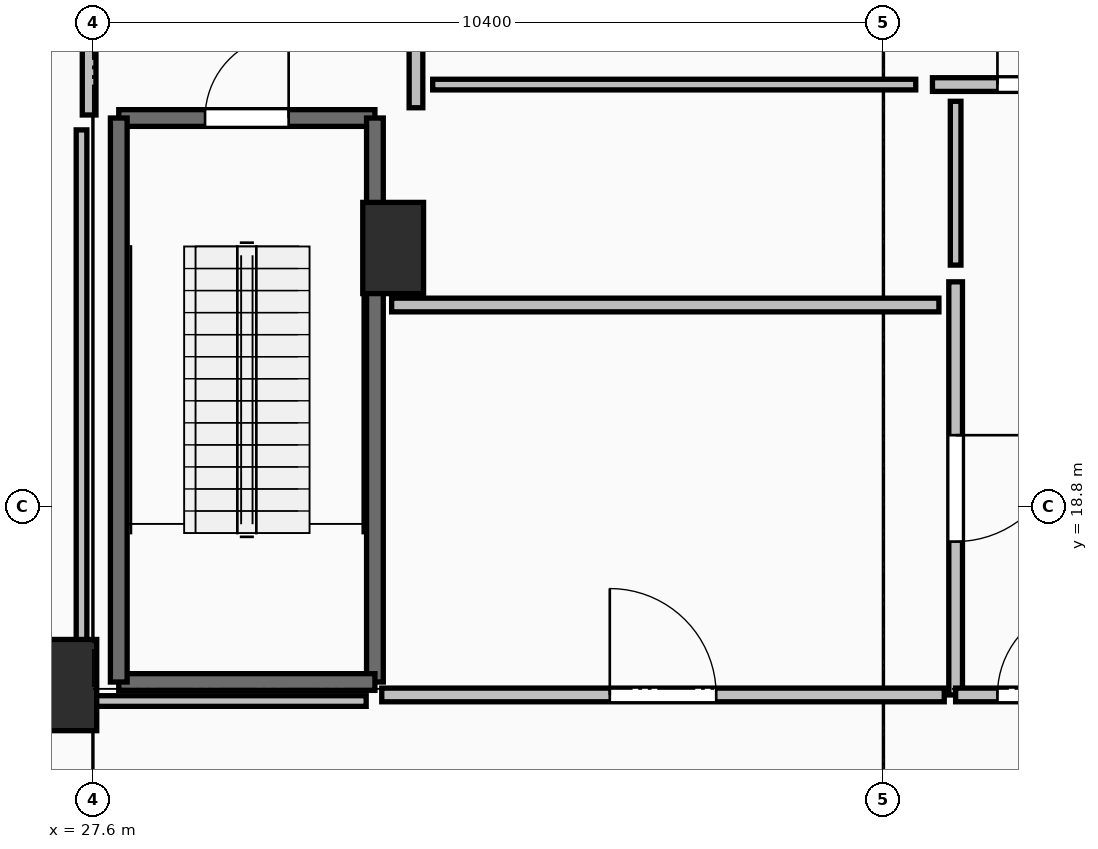
"""IFC4 building model, lengths in metres.
Left out: names, types, materials, properties, quantities, classifications, styles, units other than length and angle.
Written with IfcOpenShell. Run it as: python <this file> out.ifc"""

import sys

from ifc_helpers import new_model, si_unit, direction, frame, frame_2d, origin, origin_2d, place, context, subcontext, project, spatial, rectangle, extrude, element, fill, save


model = new_model("IFC4")
c1 = context("Model", 3, precision=1e-05, world=origin(), true_north=direction((0.0, 1.0)))
c2 = subcontext(c1, "Body", "Model", "MODEL_VIEW")
j1 = project(units=[si_unit("LENGTHUNIT", "METRE"), si_unit("PLANEANGLEUNIT", "RADIAN")], contexts=[c1])
p1 = place(None, origin())
s1 = spatial("IfcSite", under=j1, at=p1, CompositionType="ELEMENT")
p2 = place(p1, origin())
s2 = spatial("IfcBuilding", under=s1, at=p2, CompositionType="ELEMENT")
p3 = place(p2, frame((0.0, 0.0, -9.6)))
s3 = spatial("IfcBuildingStorey", under=s2, at=p3, CompositionType="ELEMENT", Elevation=-9.6)
for number, where, z_axis, x_axis in (
    (1, (27.25, 16.45, 0.0), (0.0, 0.0, 1.0), (1.0, 0.0, 0.0)),
    (2, (31.55, 22.2, 0.0), (0.0, 0.0, 1.0), (1.0, 0.0, 0.0)),
):
    element("IfcColumn", number, at=place(p3, frame(where, z_axis=z_axis, x_axis=x_axis)), inside=s3, PredefinedType="PILASTER", context=c2, shape_type="SweptSolid", body=[
        extrude(rectangle(XDim=0.8, YDim=1.2, at=origin_2d()), origin(), (0.0, 0.0, 1.0), 4.8),
    ])
p4 = place(p3, frame((27.94, 23.91, 0.0), z_axis=(0.0, 0.0, 1.0), x_axis=(1.0, 0.0, 0.0)))
e3 = element("IfcWall", 3, at=p4, inside=s3, PredefinedType="SOLIDWALL", context=c2, shape_type="SweptSolid", body=[
    extrude(rectangle(XDim=3.37, YDim=0.22, at=frame_2d((1.685, 0.0))), origin(), (0.0, 0.0, 1.0), 4.45),
])
p5 = place(p4, frame((1.135, 0.0, 0.0)))
e4 = element("IfcOpeningElement", 4, at=p5, cuts=e3, PredefinedType="OPENING", context=c2, shape_type="SweptSolid", body=[
    extrude(rectangle(XDim=1.1, YDim=2.15, at=frame_2d((0.55, 1.075))), frame((0.0, 0.125, 0.0), z_axis=(0.0, -1.0, 0.0), x_axis=(1.0, 0.0, 0.0)), (0.0, 0.0, 1.0), 0.25),
])
p6 = place(p3, frame((31.31, 23.91, 0.0), z_axis=(0.0, 0.0, 1.0), x_axis=(0.0, -1.0, 0.0)))
e5 = element("IfcWall", 5, at=p6, inside=s3, PredefinedType="SOLIDWALL", context=c2, shape_type="SweptSolid", body=[
    extrude(rectangle(XDim=7.42, YDim=0.22, at=frame_2d((3.71, 0.0))), origin(), (0.0, 0.0, 1.0), 4.45),
])
p7 = place(p3, frame((31.31, 16.49, 0.0), z_axis=(0.0, 0.0, 1.0), x_axis=(-1.0, 0.0, 0.0)))
e6 = element("IfcWall", 6, at=p7, inside=s3, PredefinedType="SOLIDWALL", context=c2, shape_type="SweptSolid", body=[
    extrude(rectangle(XDim=3.37, YDim=0.22, at=frame_2d((1.685, 0.0))), origin(), (0.0, 0.0, 1.0), 4.45),
])
p8 = place(p3, frame((27.94, 16.49, 0.0), z_axis=(0.0, 0.0, 1.0), x_axis=(0.0, 1.0, 0.0)))
e7 = element("IfcWall", 7, at=p8, inside=s3, PredefinedType="SOLIDWALL", context=c2, shape_type="SweptSolid", body=[
    extrude(rectangle(XDim=7.42, YDim=0.22, at=frame_2d((3.71, 0.0))), origin(), (0.0, 0.0, 1.0), 4.45),
])
p9 = place(p3, frame((31.85, 24.045, 0.0), z_axis=(0.0, 0.0, 1.0), x_axis=(0.0, 1.0, 0.0)))
e8 = element("IfcWall", 8, at=p9, inside=s3, PredefinedType="PARTITIONING", context=c2, shape_type="SweptSolid", body=[
    extrude(rectangle(XDim=3.91, YDim=0.18, at=frame_2d((1.955, 0.0))), origin(), (0.0, 0.0, 1.0), 4.45),
])
p10 = place(p9, frame((1.355, 0.0, 0.0)))
e9 = element("IfcOpeningElement", 9, at=p10, cuts=e8, PredefinedType="OPENING", context=c2, shape_type="SweptSolid", body=[
    extrude(rectangle(XDim=1.2, YDim=2.15, at=frame_2d((0.6, 1.075))), frame((0.0, 0.105, 0.0), z_axis=(0.0, -1.0, 0.0), x_axis=(1.0, 0.0, 0.0)), (0.0, 0.0, 1.0), 0.21),
])
p11 = place(p3, frame((27.55, 28.0, 0.0), z_axis=(0.0, 0.0, 1.0), x_axis=(0.0, -1.0, 0.0)))
e10 = element("IfcWall", 10, at=p11, inside=s3, PredefinedType="PARTITIONING", context=c2, shape_type="SweptSolid", body=[
    extrude(rectangle(XDim=4.05, YDim=0.18, at=frame_2d((2.025, 0.0))), origin(), (0.0, 0.0, 1.0), 3.03),
])
p12 = place(p11, frame((1.425, 0.0, 0.0)))
e11 = element("IfcOpeningElement", 11, at=p12, cuts=e10, PredefinedType="OPENING", context=c2, shape_type="SweptSolid", body=[
    extrude(rectangle(XDim=1.2, YDim=2.15, at=frame_2d((0.6, 1.075))), frame((0.0, 0.105, 0.0), z_axis=(0.0, -1.0, 0.0), x_axis=(1.0, 0.0, 0.0)), (0.0, 0.0, 1.0), 0.21),
])
p13 = place(p3, frame((38.645, 24.35, 0.0), z_axis=(0.0, 0.0, 1.0), x_axis=(1.0, 0.0, 0.0)))
e12 = element("IfcWall", 12, at=p13, inside=s3, PredefinedType="PARTITIONING", context=c2, shape_type="SweptSolid", body=[
    extrude(rectangle(XDim=2.91, YDim=0.18, at=frame_2d((1.455, 0.0))), origin(), (0.0, 0.0, 1.0), 4.45),
])
p14 = place(p13, frame((0.855, 0.0, 0.0)))
e13 = element("IfcOpeningElement", 13, at=p14, cuts=e12, PredefinedType="OPENING", context=c2, shape_type="SweptSolid", body=[
    extrude(rectangle(XDim=1.2, YDim=2.15, at=frame_2d((0.6, 1.075))), frame((0.0, 0.105, 0.0), z_axis=(0.0, -1.0, 0.0), x_axis=(1.0, 0.0, 0.0)), (0.0, 0.0, 1.0), 0.21),
])
p15 = place(p3, frame((38.95, 21.755, 0.0), z_axis=(0.0, 0.0, 1.0), x_axis=(0.0, -1.0, 0.0)))
e14 = element("IfcWall", 14, at=p15, inside=s3, PredefinedType="PARTITIONING", context=c2, shape_type="SweptSolid", body=[
    extrude(rectangle(XDim=5.435, YDim=0.18, at=frame_2d((2.717, 0.0))), origin(), (0.0, 0.0, 1.0), 3.03),
])
p16 = place(p15, frame((2.018, 0.0, 0.0)))
e15 = element("IfcOpeningElement", 15, at=p16, cuts=e14, PredefinedType="OPENING", context=c2, shape_type="SweptSolid", body=[
    extrude(rectangle(XDim=1.4, YDim=2.2, at=frame_2d((0.7, 1.1))), frame((0.0, 0.105, 0.0), z_axis=(0.0, -1.0, 0.0), x_axis=(1.0, 0.0, 0.0)), (0.0, 0.0, 1.0), 0.21),
])
p17 = place(p3, frame((38.95, 16.32, 0.0), z_axis=(0.0, 0.0, 1.0), x_axis=(1.0, 0.0, 0.0)))
e16 = element("IfcWall", 16, at=p17, inside=s3, PredefinedType="PARTITIONING", context=c2, shape_type="SweptSolid", body=[
    extrude(rectangle(XDim=2.3, YDim=0.18, at=frame_2d((1.15, 0.0))), origin(), (0.0, 0.0, 1.0), 4.45),
])
p18 = place(p17, frame((0.55, 0.0, 0.0)))
e17 = element("IfcOpeningElement", 17, at=p18, cuts=e16, PredefinedType="OPENING", context=c2, shape_type="SweptSolid", body=[
    extrude(rectangle(XDim=1.2, YDim=2.15, at=frame_2d((0.6, 1.075))), frame((0.0, 0.105, 0.0), z_axis=(0.0, -1.0, 0.0), x_axis=(1.0, 0.0, 0.0)), (0.0, 0.0, 1.0), 0.21),
])
p19 = place(p3, frame((31.4, 16.32, 0.0), z_axis=(0.0, 0.0, 1.0), x_axis=(1.0, 0.0, 0.0)))
e18 = element("IfcWall", 18, at=p19, inside=s3, PredefinedType="PARTITIONING", context=c2, shape_type="SweptSolid", body=[
    extrude(rectangle(XDim=7.4, YDim=0.18, at=frame_2d((3.7, 0.0))), origin(), (0.0, 0.0, 1.0), 4.45),
])
p20 = place(p19, frame((3.0, 0.0, 0.0)))
e19 = element("IfcOpeningElement", 19, at=p20, cuts=e18, PredefinedType="OPENING", context=c2, shape_type="SweptSolid", body=[
    extrude(rectangle(XDim=1.4, YDim=2.2, at=frame_2d((0.7, 1.1))), frame((0.0, 0.105, 0.0), z_axis=(0.0, -1.0, 0.0), x_axis=(1.0, 0.0, 0.0)), (0.0, 0.0, 1.0), 0.21),
])
p21 = place(p3, frame((32.07, 24.35, 0.0), z_axis=(0.0, 0.0, 1.0), x_axis=(1.0, 0.0, 0.0)))
e20 = element("IfcWall", 20, at=p21, inside=s3, PredefinedType="PARTITIONING", context=c2, shape_type="SweptSolid", body=[
    extrude(rectangle(XDim=6.355, YDim=0.14, at=frame_2d((3.177, 0.0))), origin(), (0.0, 0.0, 1.0), 4.45),
])
p22 = place(p3, frame((38.95, 24.13, 0.0), z_axis=(0.0, 0.0, 1.0), x_axis=(0.0, -1.0, 0.0)))
e21 = element("IfcWall", 21, at=p22, inside=s3, PredefinedType="PARTITIONING", context=c2, shape_type="SweptSolid", body=[
    extrude(rectangle(XDim=2.155, YDim=0.14, at=frame_2d((1.077, 0.0))), origin(), (0.0, 0.0, 1.0), 3.03),
])
p23 = place(p3, frame((38.73, 21.45, 0.0), z_axis=(0.0, 0.0, 1.0), x_axis=(-1.0, 0.0, 0.0)))
e22 = element("IfcWall", 22, at=p23, inside=s3, PredefinedType="PARTITIONING", context=c2, shape_type="SweptSolid", body=[
    extrude(rectangle(XDim=7.2, YDim=0.18, at=frame_2d((3.6, 0.0))), origin(), (0.0, 0.0, 1.0), 4.45),
])
p24 = place(p3, frame((31.195, 16.24, 0.0), z_axis=(0.0, 0.0, 1.0), x_axis=(-1.0, 0.0, 0.0)))
e23 = element("IfcWall", 23, at=p24, inside=s3, PredefinedType="PARTITIONING", context=c2, shape_type="SweptSolid", body=[
    extrude(rectangle(XDim=3.745, YDim=0.14, at=frame_2d((1.873, 0.0))), origin(), (0.0, 0.0, 1.0), 3.642),
])
p25 = place(p3, frame((27.45, 16.24, 0.0), z_axis=(0.0, 0.0, 1.0), x_axis=(0.0, 1.0, 0.0)))
e24 = element("IfcWall", 24, at=p25, inside=s3, PredefinedType="PARTITIONING", context=c2, shape_type="SweptSolid", body=[
    extrude(rectangle(XDim=7.514, YDim=0.14, at=frame_2d((3.757, 0.0))), origin(), (0.0, 0.0, 1.0), 3.03),
])
p26 = place(p5, origin())
e25 = element("IfcDoor", 25, at=p26, inside=s3, OperationType="SINGLE_SWING_RIGHT", PredefinedType="DOOR", context=c2, shape_type="SweptSolid", body=[
    extrude(rectangle(XDim=1.1, YDim=2.15, at=frame_2d((0.55, 1.075))), frame((0.0, 0.025, 0.0), z_axis=(0.0, -1.0, 0.0), x_axis=(1.0, 0.0, 0.0)), (0.0, 0.0, 1.0), 0.05),
])
fill(e4, e25)
p27 = place(p14, origin())
e26 = element("IfcDoor", 26, at=p27, inside=s3, OperationType="SINGLE_SWING_LEFT", PredefinedType="DOOR", context=c2, shape_type="SweptSolid", body=[
    extrude(rectangle(XDim=1.2, YDim=2.15, at=frame_2d((0.6, 1.075))), frame((0.0, 0.025, 0.0), z_axis=(0.0, -1.0, 0.0), x_axis=(1.0, 0.0, 0.0)), (0.0, 0.0, 1.0), 0.05),
])
fill(e13, e26)
p28 = place(p16, origin())
e27 = element("IfcDoor", 27, at=p28, inside=s3, OperationType="DOUBLE_SWING_LEFT", PredefinedType="DOOR", context=c2, shape_type="SweptSolid", body=[
    extrude(rectangle(XDim=1.4, YDim=2.2, at=frame_2d((0.7, 1.1))), frame((0.0, 0.025, 0.0), z_axis=(0.0, -1.0, 0.0), x_axis=(1.0, 0.0, 0.0)), (0.0, 0.0, 1.0), 0.05),
])
fill(e15, e27)
p29 = place(p18, origin())
e28 = element("IfcDoor", 28, at=p29, inside=s3, OperationType="SINGLE_SWING_RIGHT", PredefinedType="DOOR", context=c2, shape_type="SweptSolid", body=[
    extrude(rectangle(XDim=1.2, YDim=2.15, at=frame_2d((0.6, 1.075))), frame((0.0, 0.025, 0.0), z_axis=(0.0, -1.0, 0.0), x_axis=(1.0, 0.0, 0.0)), (0.0, 0.0, 1.0), 0.05),
])
fill(e17, e28)
p30 = place(p20, origin())
e29 = element("IfcDoor", 29, at=p30, inside=s3, OperationType="DOUBLE_SWING_LEFT", PredefinedType="DOOR", context=c2, shape_type="SweptSolid", body=[
    extrude(rectangle(XDim=1.4, YDim=2.2, at=frame_2d((0.7, 1.1))), frame((0.0, 0.025, 0.0), z_axis=(0.0, -1.0, 0.0), x_axis=(1.0, 0.0, 0.0)), (0.0, 0.0, 1.0), 0.05),
])
fill(e19, e29)
save(model, sys.argv[1])
